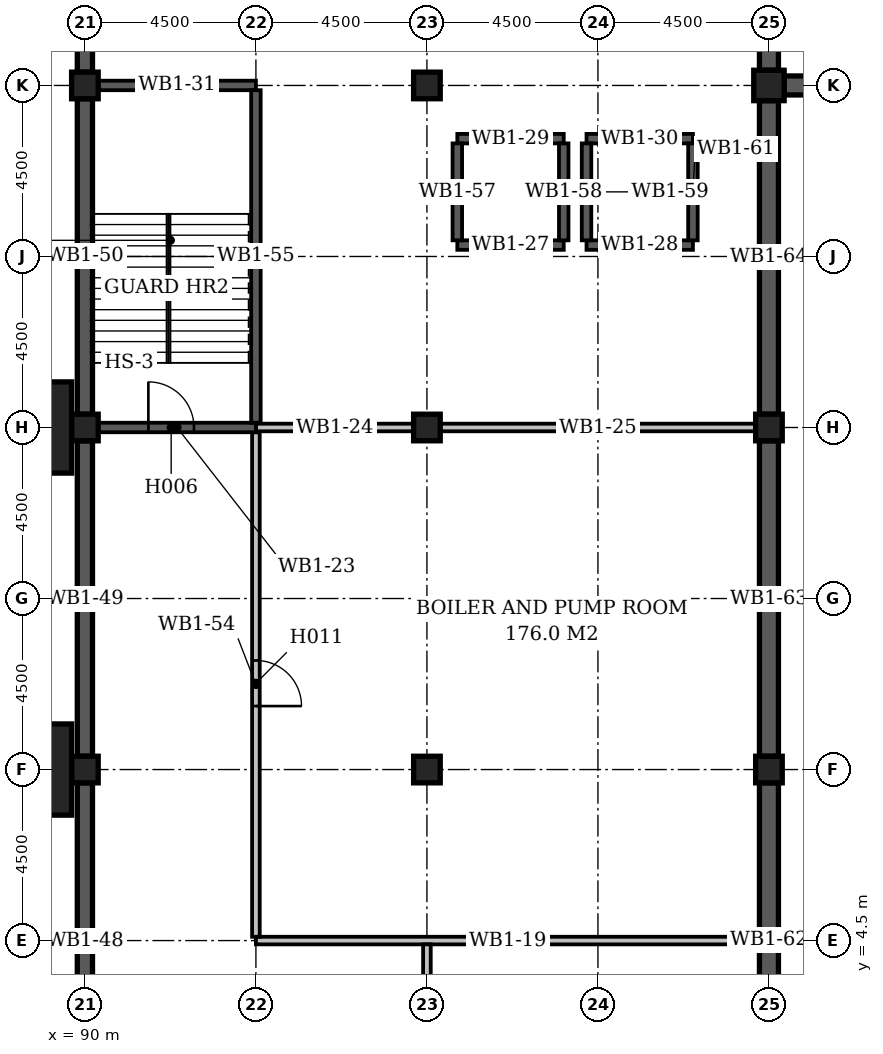
"""IFC4 building model, lengths in metres.
Left out: names, types, materials, properties, quantities, classifications, styles, units other than length and angle.
Written with IfcOpenShell. Run it as: python <this file> out.ifc"""

import sys

from ifc_helpers import new_model, si_unit, direction, frame, frame_2d, origin, origin_2d, place, context, subcontext, project, spatial, rectangle, extrude, element, fill, save


model = new_model("IFC4")
c1 = context("Model", 3, precision=1e-05, world=origin(), true_north=direction((0.0, 1.0)))
c2 = subcontext(c1, "Body", "Model", "MODEL_VIEW")
j1 = project(units=[si_unit("LENGTHUNIT", "METRE"), si_unit("PLANEANGLEUNIT", "RADIAN")], contexts=[c1])
p1 = place(None, origin())
s1 = spatial("IfcSite", under=j1, at=p1, CompositionType="ELEMENT")
p2 = place(p1, origin())
s2 = spatial("IfcBuilding", under=s1, at=p2, CompositionType="ELEMENT")
p3 = place(p2, frame((0.0, 0.0, -4.5)))
s3 = spatial("IfcBuildingStorey", under=s2, at=p3, CompositionType="ELEMENT", Elevation=-4.5)
for number, where, z_axis, x_axis in (
    (1, (90.0, 9.0, 0.0), (0.0, 0.0, 1.0), (1.0, 0.0, 0.0)),
    (2, (90.0, 18.0, 0.0), (0.0, 0.0, 1.0), (1.0, 0.0, 0.0)),
    (3, (90.0, 27.0, 0.0), (0.0, 0.0, 1.0), (1.0, 0.0, 0.0)),
    (4, (99.0, 9.0, 0.0), (0.0, 0.0, 1.0), (1.0, 0.0, 0.0)),
    (5, (99.0, 18.0, 0.0), (0.0, 0.0, 1.0), (1.0, 0.0, 0.0)),
    (6, (99.0, 27.0, 0.0), (0.0, 0.0, 1.0), (1.0, 0.0, 0.0)),
    (7, (108.0, 9.0, 0.0), (0.0, 0.0, 1.0), (1.0, 0.0, 0.0)),
    (8, (108.0, 18.0, 0.0), (0.0, 0.0, 1.0), (1.0, 0.0, 0.0)),
):
    element("IfcColumn", number, at=place(p3, frame(where, z_axis=z_axis, x_axis=x_axis)), inside=s3, PredefinedType="COLUMN", context=c2, shape_type="SweptSolid", body=[
        extrude(rectangle(XDim=0.7, YDim=0.7, at=origin_2d()), origin(), (0.0, 0.0, 1.0), 4.2),
    ])
p4 = place(p3, frame((108.0, 27.0, 0.0), z_axis=(0.0, 0.0, 1.0), x_axis=(1.0, 0.0, 0.0)))
e9 = element("IfcColumn", 9, at=p4, inside=s3, PredefinedType="COLUMN", context=c2, shape_type="SweptSolid", body=[
    extrude(rectangle(XDim=0.8, YDim=0.8, at=origin_2d()), origin(), (0.0, 0.0, 1.0), 4.2),
])
p5 = place(p3, frame((94.5, 4.5, 0.0), z_axis=(0.0, 0.0, 1.0), x_axis=(1.0, 0.0, 0.0)))
e10 = element("IfcWall", 10, at=p5, inside=s3, PredefinedType="STANDARD", context=c2, shape_type="SweptSolid", body=[
    extrude(rectangle(XDim=13.25, YDim=0.2, at=frame_2d((6.625, 0.0))), origin(), (0.0, 0.0, 1.0), 4.2),
])
p6 = place(p3, frame((90.35, 18.0, 0.0), z_axis=(0.0, 0.0, 1.0), x_axis=(1.0, 0.0, 0.0)))
e11 = element("IfcWall", 11, at=p6, inside=s3, PredefinedType="STANDARD", context=c2, shape_type="SweptSolid", body=[
    extrude(rectangle(XDim=4.15, YDim=0.25, at=frame_2d((2.075, 0.0))), origin(), (0.0, 0.0, 1.0), 4.5),
])
p7 = place(p6, frame((1.32, 0.0, 0.0)))
e12 = element("IfcOpeningElement", 12, at=p7, cuts=e11, PredefinedType="OPENING", context=c2, shape_type="SweptSolid", body=[
    extrude(rectangle(XDim=1.2, YDim=2.1, at=frame_2d((0.6, 1.05))), frame((0.0, 0.137, 0.0), z_axis=(0.0, -1.0, 0.0), x_axis=(1.0, 0.0, 0.0)), (0.0, 0.0, 1.0), 0.274),
])
p8 = place(p3, frame((94.5, 18.0, 0.0), z_axis=(0.0, 0.0, 1.0), x_axis=(1.0, 0.0, 0.0)))
e13 = element("IfcWall", 13, at=p8, inside=s3, PredefinedType="STANDARD", context=c2, shape_type="SweptSolid", body=[
    extrude(rectangle(XDim=4.15, YDim=0.2, at=frame_2d((2.075, 0.0))), origin(), (0.0, 0.0, 1.0), 4.2),
])
p9 = place(p3, frame((99.35, 18.0, 0.0), z_axis=(0.0, 0.0, 1.0), x_axis=(1.0, 0.0, 0.0)))
e14 = element("IfcWall", 14, at=p9, inside=s3, PredefinedType="STANDARD", context=c2, shape_type="SweptSolid", body=[
    extrude(rectangle(XDim=8.3, YDim=0.2, at=frame_2d((4.15, 0.0))), origin(), (0.0, 0.0, 1.0), 4.2),
])
for number, where, z_axis, x_axis in (
    (15, (99.8, 22.8, 0.0), (0.0, 0.0, 1.0), (1.0, 0.0, 0.0)),
    (16, (103.2, 22.8, 0.0), (0.0, 0.0, 1.0), (1.0, 0.0, 0.0)),
    (17, (99.8, 25.6, 0.0), (0.0, 0.0, 1.0), (1.0, 0.0, 0.0)),
    (18, (103.2, 25.6, 0.0), (0.0, 0.0, 1.0), (1.0, 0.0, 0.0)),
):
    element("IfcWall", number, at=place(p3, frame(where, z_axis=z_axis, x_axis=x_axis)), inside=s3, PredefinedType="STANDARD", context=c2, shape_type="SweptSolid", body=[
        extrude(rectangle(XDim=2.8, YDim=0.25, at=frame_2d((1.4, 0.0))), origin(), (0.0, 0.0, 1.0), 4.5),
    ])
p10 = place(p3, frame((90.35, 27.0, 0.0), z_axis=(0.0, 0.0, 1.0), x_axis=(1.0, 0.0, 0.0)))
e19 = element("IfcWall", 19, at=p10, inside=s3, PredefinedType="STANDARD", context=c2, shape_type="SweptSolid", body=[
    extrude(rectangle(XDim=4.15, YDim=0.25, at=frame_2d((2.075, 0.0))), origin(), (0.0, 0.0, 1.0), 4.5),
])
p11 = place(p3, frame((108.4, 27.0, 0.0), z_axis=(0.0, 0.0, 1.0), x_axis=(1.0, 0.0, 0.0)))
e20 = element("IfcWall", 20, at=p11, inside=s3, PredefinedType="STANDARD", context=c2, shape_type="SweptSolid", body=[
    extrude(rectangle(XDim=8.25, YDim=0.5, at=frame_2d((4.125, 0.0))), origin(), (0.0, 0.0, 1.0), 4.5),
])
for number, where, z_axis, x_axis in (
    (21, (90.0, 0.35, 0.0), (0.0, 0.0, 1.0), (0.0, 1.0, 0.0)),
    (22, (90.0, 9.35, 0.0), (0.0, 0.0, 1.0), (0.0, 1.0, 0.0)),
):
    element("IfcWall", number, at=place(p3, frame(where, z_axis=z_axis, x_axis=x_axis)), inside=s3, PredefinedType="STANDARD", context=c2, shape_type="SweptSolid", body=[
        extrude(rectangle(XDim=8.3, YDim=0.4, at=frame_2d((4.15, 0.0))), origin(), (0.0, 0.0, 1.0), 4.2),
    ])
p12 = place(p3, frame((90.0, 18.35, 0.0), z_axis=(0.0, 0.0, 1.0), x_axis=(0.0, 1.0, 0.0)))
e23 = element("IfcWall", 23, at=p12, inside=s3, PredefinedType="STANDARD", context=c2, shape_type="SweptSolid", body=[
    extrude(rectangle(XDim=8.3, YDim=0.4, at=frame_2d((4.15, 0.0))), origin(), (0.0, 0.0, 1.0), 4.5),
])
p13 = place(p3, frame((90.0, 27.35, 0.0), z_axis=(0.0, 0.0, 1.0), x_axis=(0.0, 1.0, 0.0)))
e24 = element("IfcWall", 24, at=p13, inside=s3, PredefinedType="STANDARD", context=c2, shape_type="SweptSolid", body=[
    extrude(rectangle(XDim=8.3, YDim=0.4, at=frame_2d((4.15, 0.0))), origin(), (0.0, 0.0, 1.0), 4.2),
])
p14 = place(p3, frame((94.5, 4.6, 0.0), z_axis=(0.0, 0.0, 1.0), x_axis=(0.0, 1.0, 0.0)))
e25 = element("IfcWall", 25, at=p14, inside=s3, PredefinedType="STANDARD", context=c2, shape_type="SweptSolid", body=[
    extrude(rectangle(XDim=13.275, YDim=0.2, at=frame_2d((6.637, 0.0))), origin(), (0.0, 0.0, 1.0), 4.2),
])
p15 = place(p14, frame((6.07, 0.0, 0.0)))
e26 = element("IfcOpeningElement", 26, at=p15, cuts=e25, PredefinedType="OPENING", context=c2, shape_type="SweptSolid", body=[
    extrude(rectangle(XDim=1.2, YDim=2.1, at=frame_2d((0.6, 1.05))), frame((0.0, 0.112, 0.0), z_axis=(0.0, -1.0, 0.0), x_axis=(1.0, 0.0, 0.0)), (0.0, 0.0, 1.0), 0.224),
])
p16 = place(p3, frame((94.5, 18.125, 0.0), z_axis=(0.0, 0.0, 1.0), x_axis=(0.0, 1.0, 0.0)))
e27 = element("IfcWall", 27, at=p16, inside=s3, PredefinedType="STANDARD", context=c2, shape_type="SweptSolid", body=[
    extrude(rectangle(XDim=8.75, YDim=0.25, at=frame_2d((4.375, 0.0))), origin(), (0.0, 0.0, 1.0), 4.5),
])
p17 = place(p3, frame((99.0, 0.35, 0.0), z_axis=(0.0, 0.0, 1.0), x_axis=(0.0, 1.0, 0.0)))
e28 = element("IfcWall", 28, at=p17, inside=s3, PredefinedType="STANDARD", context=c2, shape_type="SweptSolid", body=[
    extrude(rectangle(XDim=4.05, YDim=0.2, at=frame_2d((2.025, 0.0))), origin(), (0.0, 0.0, 1.0), 4.2),
])
for number, where, z_axis, x_axis in (
    (29, (99.8, 22.925, 0.0), (0.0, 0.0, 1.0), (0.0, 1.0, 0.0)),
    (30, (102.6, 22.925, 0.0), (0.0, 0.0, 1.0), (0.0, 1.0, 0.0)),
    (31, (103.2, 22.925, 0.0), (0.0, 0.0, 1.0), (0.0, 1.0, 0.0)),
    (32, (106.0, 22.925, 0.0), (0.0, 0.0, 1.0), (0.0, 1.0, 0.0)),
):
    element("IfcWall", number, at=place(p3, frame(where, z_axis=z_axis, x_axis=x_axis)), inside=s3, PredefinedType="STANDARD", context=c2, shape_type="SweptSolid", body=[
        extrude(rectangle(XDim=2.55, YDim=0.25, at=frame_2d((1.275, 0.0))), origin(), (0.0, 0.0, 1.0), 4.5),
    ])
p18 = place(p3, frame((108.0, 0.4, 0.0), z_axis=(0.0, 0.0, 1.0), x_axis=(0.0, 1.0, 0.0)))
e33 = element("IfcWall", 33, at=p18, inside=s3, PredefinedType="STANDARD", context=c2, shape_type="SweptSolid", body=[
    extrude(rectangle(XDim=8.25, YDim=0.5, at=frame_2d((4.125, 0.0))), origin(), (0.0, 0.0, 1.0), 4.5),
])
p19 = place(p3, frame((108.0, 9.35, 0.0), z_axis=(0.0, 0.0, 1.0), x_axis=(0.0, 1.0, 0.0)))
e34 = element("IfcWall", 34, at=p19, inside=s3, PredefinedType="STANDARD", context=c2, shape_type="SweptSolid", body=[
    extrude(rectangle(XDim=8.3, YDim=0.5, at=frame_2d((4.15, 0.0))), origin(), (0.0, 0.0, 1.0), 4.5),
])
for number, where, z_axis, x_axis in (
    (35, (108.0, 18.35, 0.0), (0.0, 0.0, 1.0), (0.0, 1.0, 0.0)),
    (36, (108.0, 27.4, 0.0), (0.0, 0.0, 1.0), (0.0, 1.0, 0.0)),
):
    element("IfcWall", number, at=place(p3, frame(where, z_axis=z_axis, x_axis=x_axis)), inside=s3, PredefinedType="STANDARD", context=c2, shape_type="SweptSolid", body=[
        extrude(rectangle(XDim=8.25, YDim=0.5, at=frame_2d((4.125, 0.0))), origin(), (0.0, 0.0, 1.0), 4.5),
    ])
for number, where, z_axis, x_axis in (
    (37, (88.85, 9.0, 2.8), (0.0, 0.0, 1.0), (1.0, 0.0, 0.0)),
    (38, (88.85, 18.0, 2.8), (0.0, 0.0, 1.0), (1.0, 0.0, 0.0)),
):
    element("IfcColumn", number, at=place(p3, frame(where, z_axis=z_axis, x_axis=x_axis)), inside=s3, PredefinedType="COLUMN", context=c2, shape_type="SweptSolid", body=[
        extrude(rectangle(XDim=1.6, YDim=2.4, at=origin_2d()), origin(), (0.0, 0.0, 1.0), 1.7),
    ])
p20 = place(p7, origin())
e39 = element("IfcDoor", 39, at=p20, inside=s3, OperationType="SINGLE_SWING_LEFT", PredefinedType="DOOR", context=c2, shape_type="SweptSolid", body=[
    extrude(rectangle(XDim=1.2, YDim=2.1, at=frame_2d((0.6, 1.05))), frame((0.0, 0.025, 0.0), z_axis=(0.0, -1.0, 0.0), x_axis=(1.0, 0.0, 0.0)), (0.0, 0.0, 1.0), 0.05),
])
fill(e12, e39)
p21 = place(p15, frame((1.2, 0.0, 0.0), z_axis=(0.0, 0.0, 1.0), x_axis=(-1.0, 0.0, 0.0)))
e40 = element("IfcDoor", 40, at=p21, inside=s3, OperationType="SINGLE_SWING_RIGHT", PredefinedType="DOOR", context=c2, shape_type="SweptSolid", body=[
    extrude(rectangle(XDim=1.2, YDim=2.1, at=frame_2d((0.6, 1.05))), frame((0.0, 0.025, 0.0), z_axis=(0.0, -1.0, 0.0), x_axis=(1.0, 0.0, 0.0)), (0.0, 0.0, 1.0), 0.05),
])
fill(e26, e40)
save(model, sys.argv[1])
